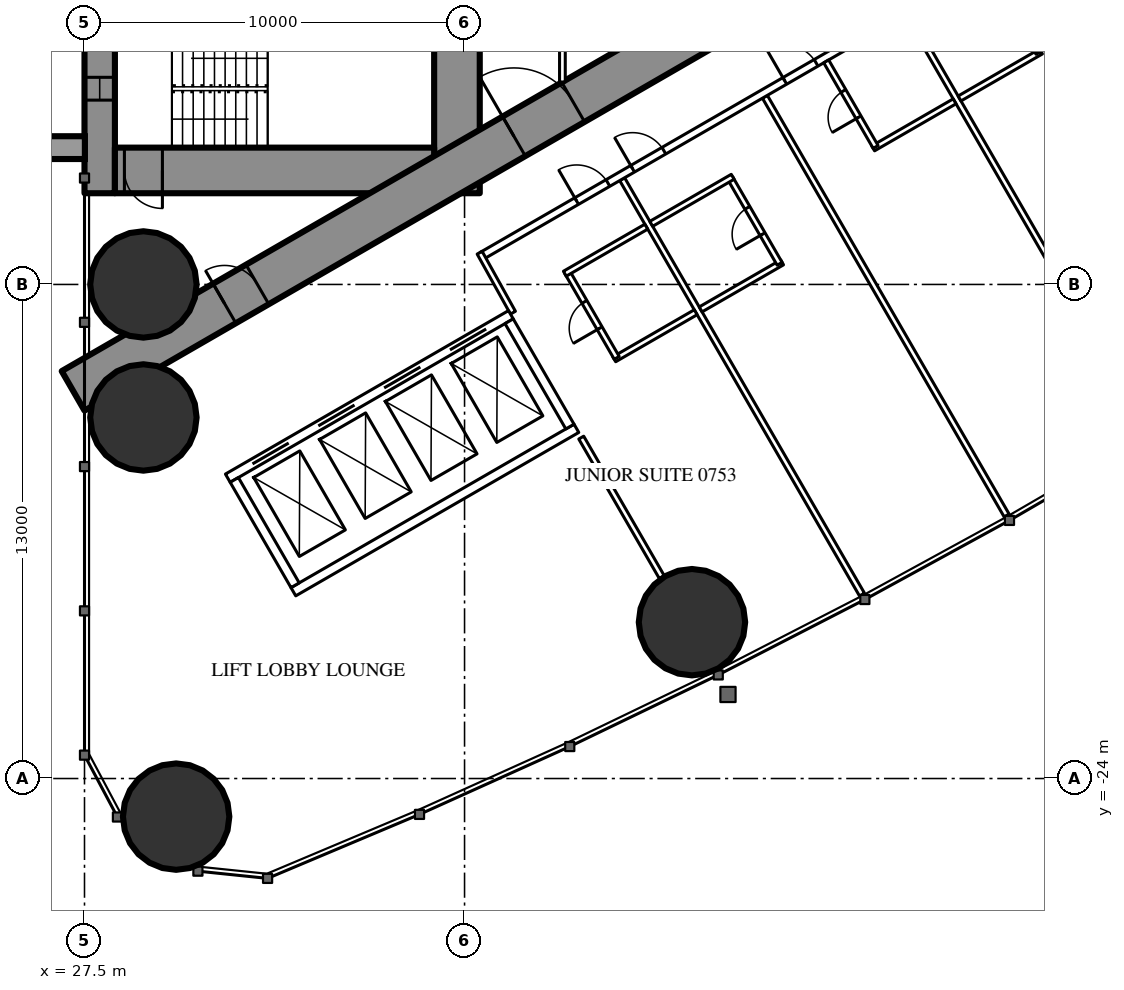
"""IFC4 building model, lengths in metres.
Left out: names, types, materials, properties, quantities, classifications, styles, units other than length and angle.
Written with IfcOpenShell. Run it as: python <this file> out.ifc"""

import sys

from ifc_helpers import new_model, si_unit, direction, frame, frame_2d, origin, origin_2d, place, context, subcontext, project, spatial, rectangle, hollow_circle, extrude, element, fill, save


model = new_model("IFC4")
c1 = context("Model", 3, precision=1e-05, world=origin(), true_north=direction((0.0, 1.0)))
c2 = subcontext(c1, "Body", "Model", "MODEL_VIEW")
j1 = project(units=[si_unit("LENGTHUNIT", "METRE"), si_unit("PLANEANGLEUNIT", "RADIAN")], contexts=[c1])
p1 = place(None, origin())
s1 = spatial("IfcSite", under=j1, at=p1, CompositionType="ELEMENT")
p2 = place(p1, origin())
s2 = spatial("IfcBuilding", under=s1, at=p2, CompositionType="ELEMENT")
p3 = place(p2, frame((0.0, 0.0, 32.0)))
s3 = spatial("IfcBuildingStorey", under=s2, at=p3, CompositionType="ELEMENT", Elevation=32.0)
for number, where, z_axis, x_axis in (
    (1, (29.911, -25.002, 0.0), (0.0, 0.0, 1.0), (1.0, 0.0, 0.0)),
    (2, (29.05, -11.0, 0.0), (0.0, 0.0, 1.0), (1.0, 0.0, 0.0)),
    (3, (29.05, -14.5, 0.0), (0.0, 0.0, 1.0), (1.0, 0.0, 0.0)),
    (4, (43.484, -19.886, 0.0), (0.0, 0.0, 1.0), (1.0, 0.0, 0.0)),
):
    element("IfcColumn", number, at=place(p3, frame(where, z_axis=z_axis, x_axis=x_axis)), inside=s3, PredefinedType="COLUMN", context=c2, shape_type="SweptSolid", body=[
        extrude(hollow_circle(Radius=1.4, WallThickness=0.12, at=origin_2d()), origin(), (0.0, 0.0, 1.0), 3.5),
    ])
p4 = place(p3, frame((27.9, -8.6, 0.0), z_axis=(0.0, 0.0, 1.0), x_axis=(0.0, 1.0, 0.0)))
e5 = element("IfcWall", 5, at=p4, inside=s3, PredefinedType="SHEAR", context=c2, shape_type="SweptSolid", body=[
    extrude(rectangle(XDim=17.2, YDim=0.8, at=frame_2d((8.6, 0.0))), origin(), (0.0, 0.0, 1.0), 3.5),
])
p5 = place(p4, frame((2.45, 0.0, 0.6)))
e6 = element("IfcOpeningElement", 6, at=p5, cuts=e5, PredefinedType="OPENING", context=c2, shape_type="SweptSolid", body=[
    extrude(rectangle(XDim=0.6, YDim=2.1, at=frame_2d((0.3, 1.05))), frame((0.0, 0.41, 0.0), z_axis=(0.0, -1.0, 0.0), x_axis=(1.0, 0.0, 0.0)), (0.0, 0.0, 1.0), 0.82),
])
p6 = place(p4, frame((14.15, 0.0, 0.6)))
e7 = element("IfcOpeningElement", 7, at=p6, cuts=e5, PredefinedType="OPENING", context=c2, shape_type="SweptSolid", body=[
    extrude(rectangle(XDim=0.6, YDim=2.1, at=frame_2d((0.3, 1.05))), frame((0.0, 0.41, 0.0), z_axis=(0.0, -1.0, 0.0), x_axis=(1.0, 0.0, 0.0)), (0.0, 0.0, 1.0), 0.82),
])
p7 = place(p3, frame((37.3, -8.6, 0.0), z_axis=(0.0, 0.0, 1.0), x_axis=(0.0, 1.0, 0.0)))
e8 = element("IfcWall", 8, at=p7, inside=s3, PredefinedType="SHEAR", context=c2, shape_type="SweptSolid", body=[
    extrude(rectangle(XDim=17.2, YDim=1.2, at=frame_2d((8.6, 0.0))), origin(), (0.0, 0.0, 1.0), 3.5),
])
p8 = place(p7, frame((7.7, 0.0, 0.0)))
e9 = element("IfcOpeningElement", 9, at=p8, cuts=e8, PredefinedType="OPENING", context=c2, shape_type="SweptSolid", body=[
    extrude(rectangle(XDim=1.8, YDim=2.2, at=frame_2d((0.9, 1.1))), frame((0.0, 0.61, 0.0), z_axis=(0.0, -1.0, 0.0), x_axis=(1.0, 0.0, 0.0)), (0.0, 0.0, 1.0), 1.22),
])
p9 = place(p3, frame((28.3, -8.0, 0.0), z_axis=(0.0, 0.0, 1.0), x_axis=(1.0, 0.0, 0.0)))
e10 = element("IfcWall", 10, at=p9, inside=s3, PredefinedType="SHEAR", context=c2, shape_type="SweptSolid", body=[
    extrude(rectangle(XDim=8.4, YDim=1.2, at=frame_2d((4.2, 0.0))), origin(), (0.0, 0.0, 1.0), 3.5),
])
p10 = place(p9, frame((0.25, 0.0, 0.0)))
e11 = element("IfcOpeningElement", 11, at=p10, cuts=e10, PredefinedType="OPENING", context=c2, shape_type="SweptSolid", body=[
    extrude(rectangle(XDim=1.0, YDim=2.2, at=frame_2d((0.5, 1.1))), frame((0.0, 0.61, 0.0), z_axis=(0.0, -1.0, 0.0), x_axis=(1.0, 0.0, 0.0)), (0.0, 0.0, 1.0), 1.22),
])
p11 = place(p3, frame((27.2, -13.8, 0.0), z_axis=(0.0, 0.0, 1.0), x_axis=(0.866027159892, 0.499996958321, 0.0)))
e12 = element("IfcWall", 12, at=p11, inside=s3, PredefinedType="SHEAR", context=c2, shape_type="SweptSolid", body=[
    extrude(rectangle(XDim=27.947, YDim=1.2, at=frame_2d((13.973, 0.0))), origin(), (0.0, 0.0, 1.0), 3.5),
])
p12 = place(p11, frame((4.6, 0.0, 0.0)))
e13 = element("IfcOpeningElement", 13, at=p12, cuts=e12, PredefinedType="OPENING", context=c2, shape_type="SweptSolid", body=[
    extrude(rectangle(XDim=1.0, YDim=2.2, at=frame_2d((0.5, 1.1))), frame((0.0, 0.61, 0.0), z_axis=(0.0, -1.0, 0.0), x_axis=(1.0, 0.0, 0.0)), (0.0, 0.0, 1.0), 1.22),
])
p13 = place(p11, frame((13.395, 0.0, 0.0)))
e14 = element("IfcOpeningElement", 14, at=p13, cuts=e12, PredefinedType="OPENING", context=c2, shape_type="SweptSolid", body=[
    extrude(rectangle(XDim=1.8, YDim=2.2, at=frame_2d((0.9, 1.1))), frame((0.0, 0.61, 0.0), z_axis=(0.0, -1.0, 0.0), x_axis=(1.0, 0.0, 0.0)), (0.0, 0.0, 1.0), 1.22),
])
p14 = place(p3, frame((41.647, -8.23, 0.0), z_axis=(0.0, 0.0, 1.0), x_axis=(0.49998590462, -0.866033541603, 0.0)))
e15 = element("IfcWall", 15, at=p14, inside=s3, PredefinedType="PARTITIONING", context=c2, shape_type="SweptSolid", body=[
    extrude(rectangle(XDim=12.621, YDim=0.15, at=frame_2d((6.311, 0.0))), origin(), (0.0, 0.0, 1.0), 3.25),
])
p15 = place(p3, frame((45.403, -6.062, 0.0), z_axis=(0.0, 0.0, 1.0), x_axis=(0.500007077968, -0.866021317279, 0.0)))
e16 = element("IfcWall", 16, at=p15, inside=s3, PredefinedType="PARTITIONING", context=c2, shape_type="SweptSolid", body=[
    extrude(rectangle(XDim=12.721, YDim=0.15, at=frame_2d((6.361, 0.0))), origin(), (0.0, 0.0, 1.0), 3.25),
])
p16 = place(p3, frame((49.159, -3.893, 0.0), z_axis=(0.0, 0.0, 1.0), x_axis=(0.499998773722, -0.866026111775, 0.0)))
e17 = element("IfcWall", 17, at=p16, inside=s3, PredefinedType="PARTITIONING", context=c2, shape_type="SweptSolid", body=[
    extrude(rectangle(XDim=9.892, YDim=0.15, at=frame_2d((4.946, 0.0))), origin(), (0.0, 0.0, 1.0), 2.25),
])
p17 = place(p3, frame((40.57, -15.03, 0.0), z_axis=(0.0, 0.0, 1.0), x_axis=(0.500012993597, -0.866017901798, 0.0)))
e18 = element("IfcWall", 18, at=p17, inside=s3, PredefinedType="PARTITIONING", context=c2, shape_type="SweptSolid", body=[
    extrude(rectangle(XDim=4.243, YDim=0.15, at=frame_2d((2.122, 0.0))), origin(), (0.0, 0.0, 1.0), 3.25),
])
p18 = place(p3, frame((37.96, -10.243, 0.0), z_axis=(0.0, 0.0, 1.0), x_axis=(0.866026429433, 0.499998223521, 0.0)))
e19 = element("IfcWall", 19, at=p18, inside=s3, PredefinedType="PARTITIONING", context=c2, shape_type="SweptSolid", body=[
    extrude(rectangle(XDim=20.487, YDim=0.2, at=frame_2d((10.243, 0.0))), origin(), (0.0, 0.0, 1.0), 3.25),
])
p19 = place(p18, frame((4.575, 0.0, 0.0)))
e20 = element("IfcOpeningElement", 20, at=p19, cuts=e19, PredefinedType="OPENING", context=c2, shape_type="SweptSolid", body=[
    extrude(rectangle(XDim=0.95, YDim=2.2, at=frame_2d((0.475, 1.1))), frame((0.0, 0.11, 0.0), z_axis=(0.0, -1.0, 0.0), x_axis=(1.0, 0.0, 0.0)), (0.0, 0.0, 1.0), 0.22),
])
p20 = place(p18, frame((9.199, 0.0, 0.0)))
e21 = element("IfcOpeningElement", 21, at=p20, cuts=e19, PredefinedType="OPENING", context=c2, shape_type="SweptSolid", body=[
    extrude(rectangle(XDim=0.95, YDim=2.2, at=frame_2d((0.475, 1.1))), frame((0.0, 0.11, 0.0), z_axis=(0.0, -1.0, 0.0), x_axis=(1.0, 0.0, 0.0)), (0.0, 0.0, 1.0), 0.22),
])
p21 = place(p18, frame((15.599, 0.0, 0.0)))
e22 = element("IfcOpeningElement", 22, at=p21, cuts=e19, PredefinedType="OPENING", context=c2, shape_type="SweptSolid", body=[
    extrude(rectangle(XDim=0.95, YDim=2.2, at=frame_2d((0.475, 1.1))), frame((0.0, 0.11, 0.0), z_axis=(0.0, -1.0, 0.0), x_axis=(1.0, 0.0, 0.0)), (0.0, 0.0, 1.0), 0.22),
])
p22 = place(p18, frame((2.875, 0.0, 0.0)))
e23 = element("IfcOpeningElement", 23, at=p22, cuts=e19, PredefinedType="OPENING", context=c2, shape_type="SweptSolid", body=[
    extrude(rectangle(XDim=0.95, YDim=2.2, at=frame_2d((0.475, 1.1))), frame((0.0, 0.11, 0.0), z_axis=(0.0, -1.0, 0.0), x_axis=(1.0, 0.0, 0.0)), (0.0, 0.0, 1.0), 0.22),
])
p23 = place(p3, frame((38.773, -11.742, 0.0), z_axis=(0.0, 0.0, 1.0), x_axis=(-0.485528096672, 0.8742210632, 0.0)))
e24 = element("IfcWall", 24, at=p23, inside=s3, PredefinedType="PARTITIONING", context=c2, shape_type="SweptSolid", body=[
    extrude(rectangle(XDim=1.805, YDim=0.15, at=frame_2d((0.903, 0.0))), origin(), (0.0, 0.0, 1.0), 3.25),
])
p24 = place(p3, frame((43.712, -11.657, 0.0), z_axis=(0.0, 0.0, 1.0), x_axis=(0.866006523861, 0.500032699561, 0.0)))
e25 = element("IfcWall", 25, at=p24, inside=s3, PredefinedType="PARTITIONING", context=c2, shape_type="SweptSolid", body=[
    extrude(rectangle(XDim=2.475, YDim=0.15, at=frame_2d((1.237, 0.0))), origin(), (0.0, 0.0, 1.0), 3.25),
])
p25 = place(p3, frame((44.491, -8.205, 0.0), z_axis=(0.0, 0.0, 1.0), x_axis=(0.500047596559, -0.865997922154, 0.0)))
e26 = element("IfcWall", 26, at=p25, inside=s3, PredefinedType="PARTITIONING", context=c2, shape_type="SweptSolid", body=[
    extrude(rectangle(XDim=2.6, YDim=0.15, at=frame_2d((1.3, 0.0))), origin(), (0.0, 0.0, 1.0), 3.25),
])
p26 = place(p25, frame((0.9, 0.0, 0.0)))
e27 = element("IfcOpeningElement", 27, at=p26, cuts=e26, PredefinedType="OPENING", context=c2, shape_type="SweptSolid", body=[
    extrude(rectangle(XDim=0.8, YDim=2.2, at=frame_2d((0.4, 1.1))), frame((0.0, 0.085, 0.0), z_axis=(0.0, -1.0, 0.0), x_axis=(1.0, 0.0, 0.0)), (0.0, 0.0, 1.0), 0.17),
])
for number, where, z_axis, x_axis in (
    (28, (42.412, -9.405, 0.0), (0.0, 0.0, 1.0), (0.866, 0.5, 0.0)),
    (29, (48.251, -7.42, 0.0), (0.0, 0.0, 1.0), (0.866, 0.5, 0.0)),
):
    element("IfcWall", number, at=place(p3, frame(where, z_axis=z_axis, x_axis=x_axis)), inside=s3, PredefinedType="PARTITIONING", context=c2, shape_type="SweptSolid", body=[
        extrude(rectangle(XDim=2.475, YDim=0.15, at=frame_2d((1.237, 0.0))), origin(), (0.0, 0.0, 1.0), 3.25),
    ])
p27 = place(p3, frame((47.016, -5.13, 0.0), z_axis=(0.0, 0.0, 1.0), x_axis=(0.500006934395, -0.866021400173, 0.0)))
e30 = element("IfcWall", 30, at=p27, inside=s3, PredefinedType="PARTITIONING", context=c2, shape_type="SweptSolid", body=[
    extrude(rectangle(XDim=2.6, YDim=0.15, at=frame_2d((1.3, 0.0))), origin(), (0.0, 0.0, 1.0), 3.25),
])
p28 = place(p27, frame((0.9, 0.0, 0.0)))
e31 = element("IfcOpeningElement", 31, at=p28, cuts=e30, PredefinedType="OPENING", context=c2, shape_type="SweptSolid", body=[
    extrude(rectangle(XDim=0.8, YDim=2.2, at=frame_2d((0.4, 1.1))), frame((0.0, 0.085, 0.0), z_axis=(0.0, -1.0, 0.0), x_axis=(1.0, 0.0, 0.0)), (0.0, 0.0, 1.0), 0.17),
])
p29 = place(p3, frame((50.524, -6.107, 0.0), z_axis=(0.0, 0.0, 1.0), x_axis=(0.866031185235, 0.4999899861, 0.0)))
e32 = element("IfcWall", 32, at=p29, inside=s3, PredefinedType="PARTITIONING", context=c2, shape_type="SweptSolid", body=[
    extrude(rectangle(XDim=2.475, YDim=0.15, at=frame_2d((1.238, 0.0))), origin(), (0.0, 0.0, 1.0), 3.25),
])
p30 = place(p3, frame((51.303, -2.656, 0.0), z_axis=(0.0, 0.0, 1.0), x_axis=(0.500047596559, -0.865997922154, 0.0)))
e33 = element("IfcWall", 33, at=p30, inside=s3, PredefinedType="PARTITIONING", context=c2, shape_type="SweptSolid", body=[
    extrude(rectangle(XDim=2.6, YDim=0.15, at=frame_2d((1.3, 0.0))), origin(), (0.0, 0.0, 1.0), 3.25),
])
p31 = place(p30, frame((0.9, 0.0, 0.0)))
e34 = element("IfcOpeningElement", 34, at=p31, cuts=e33, PredefinedType="OPENING", context=c2, shape_type="SweptSolid", body=[
    extrude(rectangle(XDim=0.8, YDim=2.2, at=frame_2d((0.4, 1.1))), frame((0.0, 0.085, 0.0), z_axis=(0.0, -1.0, 0.0), x_axis=(1.0, 0.0, 0.0)), (0.0, 0.0, 1.0), 0.17),
])
p32 = place(p3, frame((41.439, -12.969, 0.0), z_axis=(0.0, 0.0, 1.0), x_axis=(0.866031185235, 0.4999899861, 0.0)))
e35 = element("IfcWall", 35, at=p32, inside=s3, PredefinedType="PARTITIONING", context=c2, shape_type="SweptSolid", body=[
    extrude(rectangle(XDim=2.475, YDim=0.15, at=frame_2d((1.238, 0.0))), origin(), (0.0, 0.0, 1.0), 3.25),
])
p33 = place(p3, frame((40.204, -10.68, 0.0), z_axis=(0.0, 0.0, 1.0), x_axis=(0.500006934395, -0.866021400173, 0.0)))
e36 = element("IfcWall", 36, at=p33, inside=s3, PredefinedType="PARTITIONING", context=c2, shape_type="SweptSolid", body=[
    extrude(rectangle(XDim=2.6, YDim=0.15, at=frame_2d((1.3, 0.0))), origin(), (0.0, 0.0, 1.0), 3.25),
])
p34 = place(p33, frame((0.9, 0.0, 0.0)))
e37 = element("IfcOpeningElement", 37, at=p34, cuts=e36, PredefinedType="OPENING", context=c2, shape_type="SweptSolid", body=[
    extrude(rectangle(XDim=0.8, YDim=2.2, at=frame_2d((0.4, 1.1))), frame((0.0, 0.085, 0.0), z_axis=(0.0, -1.0, 0.0), x_axis=(1.0, 0.0, 0.0)), (0.0, 0.0, 1.0), 0.17),
])
p35 = place(p3, frame((40.139, -10.718, 0.0), z_axis=(0.0, 0.0, 1.0), x_axis=(0.866031185235, 0.4999899861, 0.0)))
e38 = element("IfcWall", 38, at=p35, inside=s3, PredefinedType="PARTITIONING", context=c2, shape_type="SweptSolid", body=[
    extrude(rectangle(XDim=2.475, YDim=0.15, at=frame_2d((1.238, 0.0))), origin(), (0.0, 0.0, 1.0), 3.25),
])
p36 = place(p3, frame((40.075, -5.674, 0.0), z_axis=(0.0, 0.0, 1.0), x_axis=(0.0, 1.0, 0.0)))
e39 = element("IfcWall", 39, at=p36, inside=s3, PredefinedType="PARTITIONING", context=c2, shape_type="SweptSolid", body=[
    extrude(rectangle(XDim=6.874, YDim=0.15, at=frame_2d((3.437, 0.0))), origin(), (0.0, 0.0, 1.0), 3.25),
])
p37 = place(p36, frame((2.537, 0.0, 0.0)))
e40 = element("IfcOpeningElement", 40, at=p37, cuts=e39, PredefinedType="OPENING", context=c2, shape_type="SweptSolid", body=[
    extrude(rectangle(XDim=1.8, YDim=2.2, at=frame_2d((0.9, 1.1))), frame((0.0, 0.085, 0.0), z_axis=(0.0, -1.0, 0.0), x_axis=(1.0, 0.0, 0.0)), (0.0, 0.0, 1.0), 0.17),
])
p38 = place(p3, frame((31.271, -16.097, 0.0), z_axis=(0.0, 0.0, 1.0), x_axis=(0.86604045752, 0.499973925258, 0.0)))
e41 = element("IfcWall", 41, at=p38, inside=s3, PredefinedType="PARTITIONING", context=c2, shape_type="SweptSolid", body=[
    extrude(rectangle(XDim=8.6, YDim=0.25, at=frame_2d((4.3, 0.0))), origin(), (0.0, 0.0, 1.0), 3.25),
])
p39 = place(p38, frame((0.75, 0.0, 0.0)))
e42 = element("IfcOpeningElement", 42, at=p39, cuts=e41, PredefinedType="OPENING", context=c2, shape_type="SweptSolid", body=[
    extrude(rectangle(XDim=1.1, YDim=2.2, at=frame_2d((0.55, 1.1))), frame((0.0, 0.135, 0.0), z_axis=(0.0, -1.0, 0.0), x_axis=(1.0, 0.0, 0.0)), (0.0, 0.0, 1.0), 0.27),
])
p40 = place(p38, frame((2.75, 0.0, 0.0)))
e43 = element("IfcOpeningElement", 43, at=p40, cuts=e41, PredefinedType="OPENING", context=c2, shape_type="SweptSolid", body=[
    extrude(rectangle(XDim=1.1, YDim=2.2, at=frame_2d((0.55, 1.1))), frame((0.0, 0.135, 0.0), z_axis=(0.0, -1.0, 0.0), x_axis=(1.0, 0.0, 0.0)), (0.0, 0.0, 1.0), 0.27),
])
p41 = place(p38, frame((4.75, 0.0, 0.0)))
e44 = element("IfcOpeningElement", 44, at=p41, cuts=e41, PredefinedType="OPENING", context=c2, shape_type="SweptSolid", body=[
    extrude(rectangle(XDim=1.1, YDim=2.2, at=frame_2d((0.55, 1.1))), frame((0.0, 0.135, 0.0), z_axis=(0.0, -1.0, 0.0), x_axis=(1.0, 0.0, 0.0)), (0.0, 0.0, 1.0), 0.27),
])
p42 = place(p38, frame((6.75, 0.0, 0.0)))
e45 = element("IfcOpeningElement", 45, at=p42, cuts=e41, PredefinedType="OPENING", context=c2, shape_type="SweptSolid", body=[
    extrude(rectangle(XDim=1.1, YDim=2.2, at=frame_2d((0.55, 1.1))), frame((0.0, 0.135, 0.0), z_axis=(0.0, -1.0, 0.0), x_axis=(1.0, 0.0, 0.0)), (0.0, 0.0, 1.0), 0.27),
])
p43 = place(p3, frame((32.996, -19.086, 0.0), z_axis=(0.0, 0.0, 1.0), x_axis=(0.866028165386, 0.499995216735, 0.0)))
e46 = element("IfcWall", 46, at=p43, inside=s3, PredefinedType="PARTITIONING", context=c2, shape_type="SweptSolid", body=[
    extrude(rectangle(XDim=8.6, YDim=0.25, at=frame_2d((4.3, 0.0))), origin(), (0.0, 0.0, 1.0), 3.25),
])
for number, where, z_axis, x_axis in (
    (47, (31.441, -16.143, 0.0), (0.0, 0.0, 1.0), (0.5, -0.866, 0.0)),
    (48, (38.673, -11.968, 0.0), (0.0, 0.0, 1.0), (0.5, -0.866, 0.0)),
):
    element("IfcWall", number, at=place(p3, frame(where, z_axis=z_axis, x_axis=x_axis)), inside=s3, PredefinedType="PARTITIONING", context=c2, shape_type="SweptSolid", body=[
        extrude(rectangle(XDim=3.201, YDim=0.25, at=frame_2d((1.6, 0.0))), origin(), (0.0, 0.0, 1.0), 3.25),
    ])
p44 = place(p26, origin())
e49 = element("IfcDoor", 49, at=p44, inside=s3, OperationType="SINGLE_SWING_RIGHT", PredefinedType="DOOR", context=c2, shape_type="SweptSolid", body=[
    extrude(rectangle(XDim=0.8, YDim=2.2, at=frame_2d((0.4, 1.1))), frame((0.0, 0.025, 0.0), z_axis=(0.0, -1.0, 0.0), x_axis=(1.0, 0.0, 0.0)), (0.0, 0.0, 1.0), 0.05),
])
fill(e27, e49)
p45 = place(p19, origin())
e50 = element("IfcDoor", 50, at=p45, inside=s3, OperationType="SINGLE_SWING_LEFT", PredefinedType="DOOR", context=c2, shape_type="SweptSolid", body=[
    extrude(rectangle(XDim=0.95, YDim=2.2, at=frame_2d((0.475, 1.1))), frame((0.0, 0.025, 0.0), z_axis=(0.0, -1.0, 0.0), x_axis=(1.0, 0.0, 0.0)), (0.0, 0.0, 1.0), 0.05),
])
fill(e20, e50)
p46 = place(p28, origin())
e51 = element("IfcDoor", 51, at=p46, inside=s3, OperationType="SINGLE_SWING_RIGHT", PredefinedType="DOOR", context=c2, shape_type="SweptSolid", body=[
    extrude(rectangle(XDim=0.8, YDim=2.2, at=frame_2d((0.4, 1.1))), frame((0.0, 0.025, 0.0), z_axis=(0.0, -1.0, 0.0), x_axis=(1.0, 0.0, 0.0)), (0.0, 0.0, 1.0), 0.05),
])
fill(e31, e51)
p47 = place(p20, origin())
e52 = element("IfcDoor", 52, at=p47, inside=s3, OperationType="SINGLE_SWING_LEFT", PredefinedType="DOOR", context=c2, shape_type="SweptSolid", body=[
    extrude(rectangle(XDim=0.95, YDim=2.2, at=frame_2d((0.475, 1.1))), frame((0.0, 0.025, 0.0), z_axis=(0.0, -1.0, 0.0), x_axis=(1.0, 0.0, 0.0)), (0.0, 0.0, 1.0), 0.05),
])
fill(e21, e52)
p48 = place(p34, origin())
e53 = element("IfcDoor", 53, at=p48, inside=s3, OperationType="SINGLE_SWING_RIGHT", PredefinedType="DOOR", context=c2, shape_type="SweptSolid", body=[
    extrude(rectangle(XDim=0.8, YDim=2.2, at=frame_2d((0.4, 1.1))), frame((0.0, 0.025, 0.0), z_axis=(0.0, -1.0, 0.0), x_axis=(1.0, 0.0, 0.0)), (0.0, 0.0, 1.0), 0.05),
])
fill(e37, e53)
p49 = place(p22, origin())
e54 = element("IfcDoor", 54, at=p49, inside=s3, OperationType="SINGLE_SWING_LEFT", PredefinedType="DOOR", context=c2, shape_type="SweptSolid", body=[
    extrude(rectangle(XDim=0.95, YDim=2.2, at=frame_2d((0.475, 1.1))), frame((0.0, 0.025, 0.0), z_axis=(0.0, -1.0, 0.0), x_axis=(1.0, 0.0, 0.0)), (0.0, 0.0, 1.0), 0.05),
])
fill(e23, e54)
p50 = place(p12, origin())
e55 = element("IfcDoor", 55, at=p50, inside=s3, OperationType="SINGLE_SWING_LEFT", PredefinedType="DOOR", context=c2, shape_type="SweptSolid", body=[
    extrude(rectangle(XDim=1.0, YDim=2.2, at=frame_2d((0.5, 1.1))), frame((0.0, 0.025, 0.0), z_axis=(0.0, -1.0, 0.0), x_axis=(1.0, 0.0, 0.0)), (0.0, 0.0, 1.0), 0.05),
])
fill(e13, e55)
p51 = place(p13, origin())
e56 = element("IfcDoor", 56, at=p51, inside=s3, OperationType="DOUBLE_DOOR_SINGLE_SWING", PredefinedType="DOOR", context=c2, shape_type="SweptSolid", body=[
    extrude(rectangle(XDim=1.8, YDim=2.2, at=frame_2d((0.9, 1.1))), frame((0.0, 0.025, 0.0), z_axis=(0.0, -1.0, 0.0), x_axis=(1.0, 0.0, 0.0)), (0.0, 0.0, 1.0), 0.05),
])
fill(e14, e56)
p52 = place(p10, origin())
e57 = element("IfcDoor", 57, at=p52, inside=s3, OperationType="SINGLE_SWING_RIGHT", PredefinedType="DOOR", context=c2, shape_type="SweptSolid", body=[
    extrude(rectangle(XDim=1.0, YDim=2.2, at=frame_2d((0.5, 1.1))), frame((0.0, 0.025, 0.0), z_axis=(0.0, -1.0, 0.0), x_axis=(1.0, 0.0, 0.0)), (0.0, 0.0, 1.0), 0.05),
])
fill(e11, e57)
p53 = place(p39, origin())
e58 = element("IfcDoor", 58, at=p53, inside=s3, OperationType="DOUBLE_DOOR_SLIDING", PredefinedType="USERDEFINED", context=c2, shape_type="SweptSolid", body=[
    extrude(rectangle(XDim=1.1, YDim=2.2, at=frame_2d((0.55, 1.1))), frame((0.0, 0.025, 0.0), z_axis=(0.0, -1.0, 0.0), x_axis=(1.0, 0.0, 0.0)), (0.0, 0.0, 1.0), 0.05),
])
fill(e42, e58)
p54 = place(p40, origin())
e59 = element("IfcDoor", 59, at=p54, inside=s3, OperationType="DOUBLE_DOOR_SLIDING", PredefinedType="USERDEFINED", context=c2, shape_type="SweptSolid", body=[
    extrude(rectangle(XDim=1.1, YDim=2.2, at=frame_2d((0.55, 1.1))), frame((0.0, 0.025, 0.0), z_axis=(0.0, -1.0, 0.0), x_axis=(1.0, 0.0, 0.0)), (0.0, 0.0, 1.0), 0.05),
])
fill(e43, e59)
p55 = place(p41, origin())
e60 = element("IfcDoor", 60, at=p55, inside=s3, OperationType="DOUBLE_DOOR_SLIDING", PredefinedType="USERDEFINED", context=c2, shape_type="SweptSolid", body=[
    extrude(rectangle(XDim=1.1, YDim=2.2, at=frame_2d((0.55, 1.1))), frame((0.0, 0.025, 0.0), z_axis=(0.0, -1.0, 0.0), x_axis=(1.0, 0.0, 0.0)), (0.0, 0.0, 1.0), 0.05),
])
fill(e44, e60)
p56 = place(p42, origin())
e61 = element("IfcDoor", 61, at=p56, inside=s3, OperationType="DOUBLE_DOOR_SLIDING", PredefinedType="USERDEFINED", context=c2, shape_type="SweptSolid", body=[
    extrude(rectangle(XDim=1.1, YDim=2.2, at=frame_2d((0.55, 1.1))), frame((0.0, 0.025, 0.0), z_axis=(0.0, -1.0, 0.0), x_axis=(1.0, 0.0, 0.0)), (0.0, 0.0, 1.0), 0.05),
])
fill(e45, e61)
p57 = place(p5, origin())
e62 = element("IfcWindow", 62, at=p57, inside=s3, PartitioningType="SINGLE_PANEL", PredefinedType="WINDOW", context=c2, shape_type="SweptSolid", body=[
    extrude(rectangle(XDim=0.6, YDim=2.1, at=frame_2d((0.3, 1.05))), frame((0.0, 0.03, 0.0), z_axis=(0.0, -1.0, 0.0), x_axis=(1.0, 0.0, 0.0)), (0.0, 0.0, 1.0), 0.06),
])
fill(e6, e62)
save(model, sys.argv[1])
